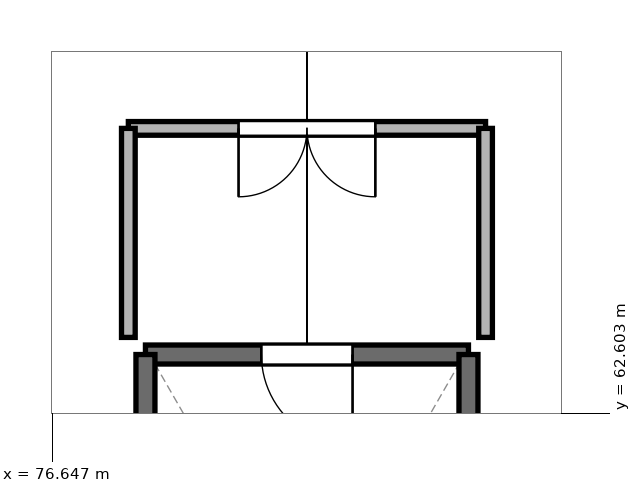
"""IFC4 building model, lengths in metres.
Left out: names, types, materials, properties, quantities, classifications, styles, units other than length and angle.
Written with IfcOpenShell. Run it as: python <this file> out.ifc"""

import sys

from ifc_helpers import new_model, si_unit, direction, frame, frame_2d, origin, place, context, subcontext, project, spatial, rectangle, extrude, element, fill, save


model = new_model("IFC4")
c1 = context("Model", 3, precision=1e-05, world=origin(), true_north=direction((0.0, 1.0)))
c2 = subcontext(c1, "Body", "Model", "MODEL_VIEW")
j1 = project(units=[si_unit("LENGTHUNIT", "METRE"), si_unit("PLANEANGLEUNIT", "RADIAN")], contexts=[c1])
p1 = place(None, origin())
s1 = spatial("IfcSite", under=j1, at=p1, CompositionType="ELEMENT")
p2 = place(p1, origin())
s2 = spatial("IfcBuilding", under=s1, at=p2, CompositionType="ELEMENT")
p3 = place(p2, frame((0.0, 0.0, 66.55)))
s3 = spatial("IfcBuildingStorey", under=s2, at=p3, CompositionType="ELEMENT", Elevation=66.55)
p4 = place(p3, frame((82.125, 63.375, 0.0), z_axis=(0.0, 0.0, 1.0), x_axis=(-1.0, 0.0, 0.0)))
e1 = element("IfcWall", 1, at=p4, inside=s3, PredefinedType="SHEAR", context=c2, shape_type="SweptSolid", body=[
    extrude(rectangle(XDim=4.25, YDim=0.25, at=frame_2d((2.125, 0.0))), origin(), (0.0, 0.0, 1.0), 2.95),
])
p5 = place(p4, frame((1.525, 0.0, 0.0)))
e2 = element("IfcOpeningElement", 2, at=p5, cuts=e1, PredefinedType="OPENING", context=c2, shape_type="SweptSolid", body=[
    extrude(rectangle(XDim=1.2, YDim=2.2, at=frame_2d((0.6, 1.1))), frame((0.0, 0.137, 0.0), z_axis=(0.0, -1.0, 0.0), x_axis=(1.0, 0.0, 0.0)), (0.0, 0.0, 1.0), 0.274),
])
for number, where, z_axis, x_axis in (
    (3, (77.875, 63.375, 0.0), (0.0, 0.0, 1.0), (0.0, -1.0, 0.0)),
    (4, (82.125, 56.175, 0.0), (0.0, 0.0, 1.0), (0.0, 1.0, 0.0)),
):
    element("IfcWall", number, at=place(p3, frame(where, z_axis=z_axis, x_axis=x_axis)), inside=s3, PredefinedType="SHEAR", context=c2, shape_type="SweptSolid", body=[
        extrude(rectangle(XDim=7.2, YDim=0.25, at=frame_2d((3.6, 0.0))), origin(), (0.0, 0.0, 1.0), 2.95),
    ])
p6 = place(p3, frame((77.65, 66.35, 0.0), z_axis=(0.0, 0.0, 1.0), x_axis=(1.0, 0.0, 0.0)))
e5 = element("IfcWall", 5, at=p6, inside=s3, PredefinedType="PARTITIONING", context=c2, shape_type="SweptSolid", body=[
    extrude(rectangle(XDim=4.7, YDim=0.18, at=frame_2d((2.35, 0.0))), origin(), (0.0, 0.0, 1.0), 2.53),
])
p7 = place(p6, frame((1.45, 0.0, 0.0)))
e6 = element("IfcOpeningElement", 6, at=p7, cuts=e5, PredefinedType="OPENING", context=c2, shape_type="SweptSolid", body=[
    extrude(rectangle(XDim=1.8, YDim=2.2, at=frame_2d((0.9, 1.1))), frame((0.0, 0.102, 0.0), z_axis=(0.0, -1.0, 0.0), x_axis=(1.0, 0.0, 0.0)), (0.0, 0.0, 1.0), 0.204),
])
for number, where, z_axis, x_axis in (
    (7, (77.65, 63.6, 0.0), (0.0, 0.0, 1.0), (0.0, 1.0, 0.0)),
    (8, (82.35, 63.6, 0.0), (0.0, 0.0, 1.0), (0.0, 1.0, 0.0)),
):
    element("IfcWall", number, at=place(p3, frame(where, z_axis=z_axis, x_axis=x_axis)), inside=s3, PredefinedType="PARTITIONING", context=c2, shape_type="SweptSolid", body=[
        extrude(rectangle(XDim=2.75, YDim=0.18, at=frame_2d((1.375, 0.0))), origin(), (0.0, 0.0, 1.0), 2.53),
    ])
p8 = place(p5, origin())
e9 = element("IfcDoor", 9, at=p8, inside=s3, OperationType="SINGLE_SWING_LEFT", PredefinedType="DOOR", context=c2, shape_type="SweptSolid", body=[
    extrude(rectangle(XDim=1.2, YDim=2.2, at=frame_2d((0.6, 1.1))), frame((0.0, 0.025, 0.0), z_axis=(0.0, -1.0, 0.0), x_axis=(1.0, 0.0, 0.0)), (0.0, 0.0, 1.0), 0.05),
])
fill(e2, e9)
p9 = place(p7, frame((1.8, 0.0, 0.0), z_axis=(0.0, 0.0, 1.0), x_axis=(-1.0, 0.0, 0.0)))
e10 = element("IfcDoor", 10, at=p9, inside=s3, OperationType="DOUBLE_DOOR_SINGLE_SWING", PredefinedType="DOOR", context=c2, shape_type="SweptSolid", body=[
    extrude(rectangle(XDim=1.8, YDim=2.2, at=frame_2d((0.9, 1.1))), frame((0.0, 0.025, 0.0), z_axis=(0.0, -1.0, 0.0), x_axis=(1.0, 0.0, 0.0)), (0.0, 0.0, 1.0), 0.05),
])
fill(e6, e10)
save(model, sys.argv[1])
